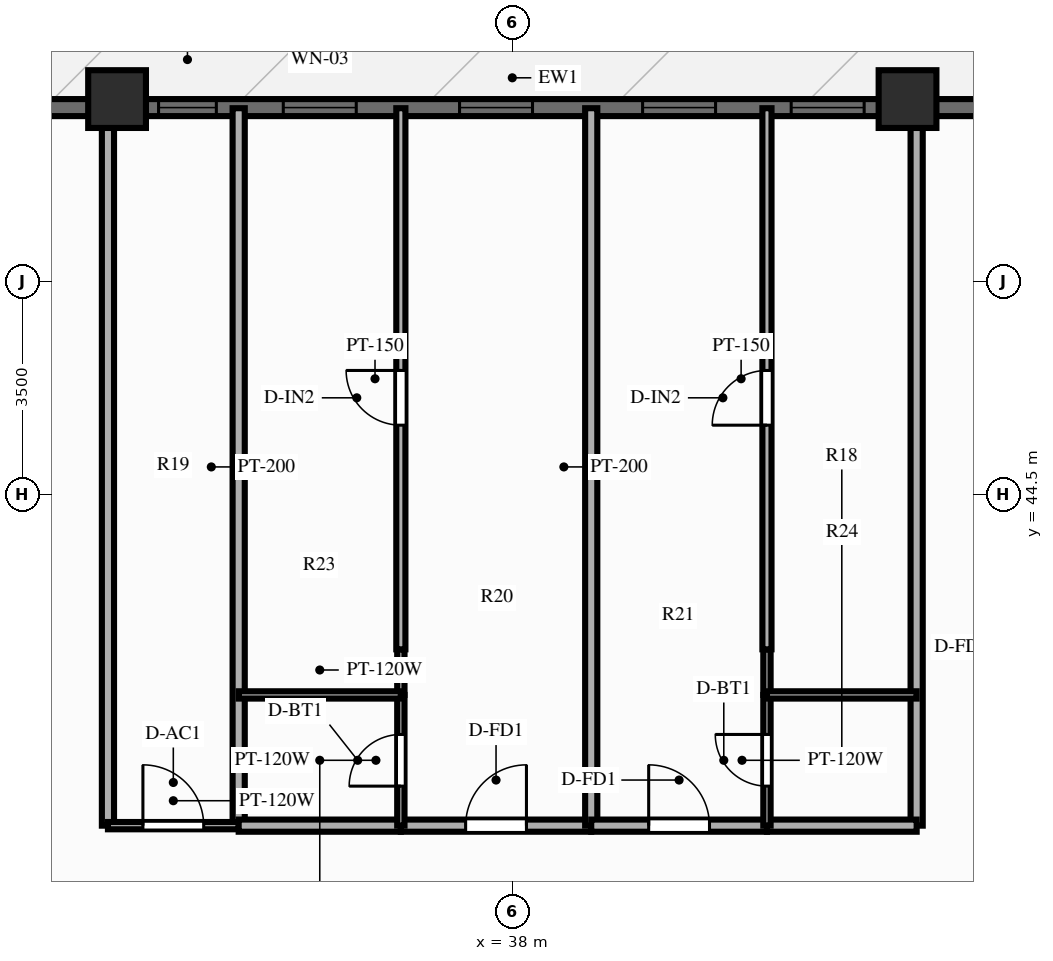
"""IFC4 building model, lengths in metres.
Left out: names, types, materials, properties, quantities, classifications, styles, units other than length and angle.
Written with IfcOpenShell. Run it as: python <this file> out.ifc"""

import sys

from ifc_helpers import new_model, si_unit, direction, frame, frame_2d, origin, origin_2d, place, context, subcontext, project, spatial, rectangle, extrude, source, transform, mapped, element, fill, save


model = new_model("IFC4")
c1 = context("Model", 3, precision=1e-05, world=origin(), true_north=direction((0.0, 1.0)))
c2 = subcontext(c1, "Body", "Model", "MODEL_VIEW")
j1 = project(units=[si_unit("LENGTHUNIT", "METRE"), si_unit("PLANEANGLEUNIT", "RADIAN")], contexts=[c1])
p1 = place(None, origin())
s1 = spatial("IfcSite", under=j1, at=p1, CompositionType="ELEMENT")
p2 = place(p1, origin())
s2 = spatial("IfcBuilding", under=s1, at=p2, CompositionType="ELEMENT")
p3 = place(p2, frame((0.0, 0.0, 95.85)))
s3 = spatial("IfcBuildingStorey", under=s2, at=p3, CompositionType="ELEMENT", Elevation=95.85)
m1 = source(origin(), c2, "Body", "SweptSolid", [
    extrude(rectangle(XDim=0.95, YDim=0.95, at=origin_2d()), origin(), (0.0, 0.0, 1.0), 3.0),
])
for number, where, z_axis, x_axis in (
    (1, (44.5, 51.0, 0.0), (0.0, 0.0, 1.0), (1.0, 0.0, 0.0)),
    (2, (31.5, 51.0, 0.0), (0.0, 0.0, 1.0), (1.0, 0.0, 0.0)),
):
    element("IfcColumn", number, at=place(p3, frame(where, z_axis=z_axis, x_axis=x_axis)), inside=s3, PredefinedType="COLUMN", context=c2, shape_type="MappedRepresentation", body=[
        mapped(m1, transform((0.0, 0.0, 0.0), scale=1.0)),
    ])
p4 = place(p3, frame((16.2, 50.86, 0.0), z_axis=(0.0, 0.0, 1.0), x_axis=(1.0, 0.0, 0.0)))
e3 = element("IfcWall", 3, at=p4, inside=s3, PredefinedType="SOLIDWALL", context=c2, shape_type="SweptSolid", body=[
    extrude(rectangle(XDim=43.6, YDim=0.28, at=frame_2d((21.8, 0.0))), origin(), (0.0, 0.0, 1.0), 2.28),
])
p5 = place(p4, frame((7.1, 0.0, 0.0)))
e4 = element("IfcOpeningElement", 4, at=p5, cuts=e3, PredefinedType="OPENING", context=c2, shape_type="SweptSolid", body=[
    extrude(rectangle(XDim=1.1, YDim=2.15, at=frame_2d((0.55, 1.075))), frame((0.0, 0.152, 0.0), z_axis=(0.0, -1.0, 0.0), x_axis=(1.0, 0.0, 0.0)), (0.0, 0.0, 1.0), 0.304),
])
p6 = place(p4, frame((15.982, 0.0, 0.25)))
e5 = element("IfcOpeningElement", 5, at=p6, cuts=e3, PredefinedType="OPENING", context=c2, shape_type="SweptSolid", body=[
    extrude(rectangle(XDim=0.95, YDim=1.5, at=frame_2d((0.475, 0.75))), frame((0.0, 0.152, 0.0), z_axis=(0.0, -1.0, 0.0), x_axis=(1.0, 0.0, 0.0)), (0.0, 0.0, 1.0), 0.304),
])
p7 = place(p4, frame((18.033, 0.0, 0.25)))
e6 = element("IfcOpeningElement", 6, at=p7, cuts=e3, PredefinedType="OPENING", context=c2, shape_type="SweptSolid", body=[
    extrude(rectangle(XDim=1.2, YDim=1.5, at=frame_2d((0.6, 0.75))), frame((0.0, 0.152, 0.0), z_axis=(0.0, -1.0, 0.0), x_axis=(1.0, 0.0, 0.0)), (0.0, 0.0, 1.0), 0.304),
])
p8 = place(p4, frame((20.933, 0.0, 0.25)))
e7 = element("IfcOpeningElement", 7, at=p8, cuts=e3, PredefinedType="OPENING", context=c2, shape_type="SweptSolid", body=[
    extrude(rectangle(XDim=1.2, YDim=1.5, at=frame_2d((0.6, 0.75))), frame((0.0, 0.152, 0.0), z_axis=(0.0, -1.0, 0.0), x_axis=(1.0, 0.0, 0.0)), (0.0, 0.0, 1.0), 0.304),
])
p9 = place(p4, frame((23.943, 0.0, 0.25)))
e8 = element("IfcOpeningElement", 8, at=p9, cuts=e3, PredefinedType="OPENING", context=c2, shape_type="SweptSolid", body=[
    extrude(rectangle(XDim=1.2, YDim=1.5, at=frame_2d((0.6, 0.75))), frame((0.0, 0.152, 0.0), z_axis=(0.0, -1.0, 0.0), x_axis=(1.0, 0.0, 0.0)), (0.0, 0.0, 1.0), 0.304),
])
p10 = place(p4, frame((26.386, 0.0, 0.25)))
e9 = element("IfcOpeningElement", 9, at=p10, cuts=e3, PredefinedType="OPENING", context=c2, shape_type="SweptSolid", body=[
    extrude(rectangle(XDim=1.2, YDim=1.5, at=frame_2d((0.6, 0.75))), frame((0.0, 0.152, 0.0), z_axis=(0.0, -1.0, 0.0), x_axis=(1.0, 0.0, 0.0)), (0.0, 0.0, 1.0), 0.304),
])
p11 = place(p4, frame((35.35, 0.0, 0.25)))
e10 = element("IfcOpeningElement", 10, at=p11, cuts=e3, PredefinedType="OPENING", context=c2, shape_type="SweptSolid", body=[
    extrude(rectangle(XDim=1.2, YDim=1.5, at=frame_2d((0.6, 0.75))), frame((0.0, 0.152, 0.0), z_axis=(0.0, -1.0, 0.0), x_axis=(1.0, 0.0, 0.0)), (0.0, 0.0, 1.0), 0.304),
])
for number, where, z_axis, x_axis in (
    (11, (31.35, 39.05, 0.0), (0.0, 0.0, 1.0), (0.0, 1.0, 0.0)),
    (12, (44.65, 39.05, 0.0), (0.0, 0.0, 1.0), (0.0, 1.0, 0.0)),
):
    element("IfcWall", number, at=place(p3, frame(where, z_axis=z_axis, x_axis=x_axis)), inside=s3, PredefinedType="PARTITIONING", context=c2, shape_type="SweptSolid", body=[
        extrude(rectangle(XDim=11.8, YDim=0.2, at=frame_2d((5.9, 0.0))), origin(), (0.0, 0.0, 1.0), 2.34),
    ])
p12 = place(p3, frame((33.5, 39.05, 0.0), z_axis=(0.0, 0.0, 1.0), x_axis=(0.0, 1.0, 0.0)))
e13 = element("IfcWall", 13, at=p12, inside=s3, PredefinedType="PARTITIONING", context=c2, shape_type="SweptSolid", body=[
    extrude(rectangle(XDim=11.8, YDim=0.2, at=frame_2d((5.9, 0.0))), origin(), (0.0, 0.0, 1.0), 2.79),
])
p13 = place(p3, frame((31.35, 39.05, 0.0), z_axis=(0.0, 0.0, 1.0), x_axis=(1.0, 0.0, 0.0)))
e14 = element("IfcWall", 14, at=p13, inside=s3, PredefinedType="PARTITIONING", context=c2, shape_type="SweptSolid", body=[
    extrude(rectangle(XDim=2.15, YDim=0.12, at=frame_2d((1.075, 0.0))), origin(), (0.0, 0.0, 1.0), 2.79),
])
p14 = place(p13, frame((0.575, 0.0, 0.0)))
e15 = element("IfcOpeningElement", 15, at=p14, cuts=e14, PredefinedType="OPENING", context=c2, shape_type="SweptSolid", body=[
    extrude(rectangle(XDim=1.0, YDim=2.1, at=frame_2d((0.5, 1.05))), frame((0.0, 0.072, 0.0), z_axis=(0.0, -1.0, 0.0), x_axis=(1.0, 0.0, 0.0)), (0.0, 0.0, 1.0), 0.144),
])
p15 = place(p3, frame((33.5, 39.05, 0.0), z_axis=(0.0, 0.0, 1.0), x_axis=(1.0, 0.0, 0.0)))
e16 = element("IfcWall", 16, at=p15, inside=s3, PredefinedType="PARTITIONING", context=c2, shape_type="SweptSolid", body=[
    extrude(rectangle(XDim=2.667, YDim=0.2, at=frame_2d((1.333, 0.0))), origin(), (0.0, 0.0, 1.0), 2.79),
])
p16 = place(p3, frame((36.167, 39.05, 0.0), z_axis=(0.0, 0.0, 1.0), x_axis=(1.0, 0.0, 0.0)))
e17 = element("IfcWall", 17, at=p16, inside=s3, PredefinedType="PARTITIONING", context=c2, shape_type="SweptSolid", body=[
    extrude(rectangle(XDim=3.131, YDim=0.2, at=frame_2d((1.565, 0.0))), origin(), (0.0, 0.0, 1.0), 2.79),
])
p17 = place(p16, frame((1.065, 0.0, 0.0)))
e18 = element("IfcOpeningElement", 18, at=p17, cuts=e17, PredefinedType="OPENING", context=c2, shape_type="SweptSolid", body=[
    extrude(rectangle(XDim=1.0, YDim=2.15, at=frame_2d((0.5, 1.075))), frame((0.0, 0.112, 0.0), z_axis=(0.0, -1.0, 0.0), x_axis=(1.0, 0.0, 0.0)), (0.0, 0.0, 1.0), 0.224),
])
p18 = place(p3, frame((36.167, 39.05, 0.0), z_axis=(0.0, 0.0, 1.0), x_axis=(0.0, 1.0, 0.0)))
e19 = element("IfcWall", 19, at=p18, inside=s3, PredefinedType="PARTITIONING", context=c2, shape_type="SweptSolid", body=[
    extrude(rectangle(XDim=2.15, YDim=0.12, at=frame_2d((1.075, 0.0))), origin(), (0.0, 0.0, 1.0), 2.79),
])
p19 = place(p18, frame((0.65, 0.0, 0.0)))
e20 = element("IfcOpeningElement", 20, at=p19, cuts=e19, PredefinedType="OPENING", context=c2, shape_type="SweptSolid", body=[
    extrude(rectangle(XDim=0.85, YDim=2.05, at=frame_2d((0.425, 1.025))), frame((0.0, 0.072, 0.0), z_axis=(0.0, -1.0, 0.0), x_axis=(1.0, 0.0, 0.0)), (0.0, 0.0, 1.0), 0.144),
])
p20 = place(p3, frame((36.167, 41.2, 0.0), z_axis=(0.0, 0.0, 1.0), x_axis=(0.0, 1.0, 0.0)))
e21 = element("IfcWall", 21, at=p20, inside=s3, PredefinedType="PARTITIONING", context=c2, shape_type="SweptSolid", body=[
    extrude(rectangle(XDim=0.75, YDim=0.12, at=frame_2d((0.375, 0.0))), origin(), (0.0, 0.0, 1.0), 2.79),
])
p21 = place(p3, frame((33.5, 41.2, 0.0), z_axis=(0.0, 0.0, 1.0), x_axis=(1.0, 0.0, 0.0)))
e22 = element("IfcWall", 22, at=p21, inside=s3, PredefinedType="PARTITIONING", context=c2, shape_type="SweptSolid", body=[
    extrude(rectangle(XDim=2.667, YDim=0.12, at=frame_2d((1.333, 0.0))), origin(), (0.0, 0.0, 1.0), 2.79),
])
p22 = place(p3, frame((36.167, 41.95, 0.0), z_axis=(0.0, 0.0, 1.0), x_axis=(0.0, 1.0, 0.0)))
e23 = element("IfcWall", 23, at=p22, inside=s3, PredefinedType="PARTITIONING", context=c2, shape_type="SweptSolid", body=[
    extrude(rectangle(XDim=8.9, YDim=0.15, at=frame_2d((4.45, 0.0))), origin(), (0.0, 0.0, 1.0), 2.79),
])
p23 = place(p22, frame((3.687, 0.0, 0.0)))
e24 = element("IfcOpeningElement", 24, at=p23, cuts=e23, PredefinedType="OPENING", context=c2, shape_type="SweptSolid", body=[
    extrude(rectangle(XDim=0.9, YDim=2.1, at=frame_2d((0.45, 1.05))), frame((0.0, 0.087, 0.0), z_axis=(0.0, -1.0, 0.0), x_axis=(1.0, 0.0, 0.0)), (0.0, 0.0, 1.0), 0.174),
])
p24 = place(p3, frame((39.298, 39.05, 0.0), z_axis=(0.0, 0.0, 1.0), x_axis=(0.0, 1.0, 0.0)))
e25 = element("IfcWall", 25, at=p24, inside=s3, PredefinedType="PARTITIONING", context=c2, shape_type="SweptSolid", body=[
    extrude(rectangle(XDim=11.8, YDim=0.2, at=frame_2d((5.9, 0.0))), origin(), (0.0, 0.0, 1.0), 2.79),
])
p25 = place(p3, frame((39.298, 39.05, 0.0), z_axis=(0.0, 0.0, 1.0), x_axis=(1.0, 0.0, 0.0)))
e26 = element("IfcWall", 26, at=p25, inside=s3, PredefinedType="PARTITIONING", context=c2, shape_type="SweptSolid", body=[
    extrude(rectangle(XDim=2.89, YDim=0.2, at=frame_2d((1.445, 0.0))), origin(), (0.0, 0.0, 1.0), 2.79),
])
p26 = place(p25, frame((0.945, 0.0, 0.0)))
e27 = element("IfcOpeningElement", 27, at=p26, cuts=e26, PredefinedType="OPENING", context=c2, shape_type="SweptSolid", body=[
    extrude(rectangle(XDim=1.0, YDim=2.15, at=frame_2d((0.5, 1.075))), frame((0.0, 0.112, 0.0), z_axis=(0.0, -1.0, 0.0), x_axis=(1.0, 0.0, 0.0)), (0.0, 0.0, 1.0), 0.224),
])
p27 = place(p3, frame((42.188, 39.05, 0.0), z_axis=(0.0, 0.0, 1.0), x_axis=(1.0, 0.0, 0.0)))
e28 = element("IfcWall", 28, at=p27, inside=s3, PredefinedType="PARTITIONING", context=c2, shape_type="SweptSolid", body=[
    extrude(rectangle(XDim=2.462, YDim=0.2, at=frame_2d((1.231, 0.0))), origin(), (0.0, 0.0, 1.0), 2.79),
])
p28 = place(p3, frame((42.188, 39.05, 0.0), z_axis=(0.0, 0.0, 1.0), x_axis=(0.0, 1.0, 0.0)))
e29 = element("IfcWall", 29, at=p28, inside=s3, PredefinedType="PARTITIONING", context=c2, shape_type="SweptSolid", body=[
    extrude(rectangle(XDim=2.15, YDim=0.12, at=frame_2d((1.075, 0.0))), origin(), (0.0, 0.0, 1.0), 2.79),
])
p29 = place(p28, frame((0.65, 0.0, 0.0)))
e30 = element("IfcOpeningElement", 30, at=p29, cuts=e29, PredefinedType="OPENING", context=c2, shape_type="SweptSolid", body=[
    extrude(rectangle(XDim=0.85, YDim=2.05, at=frame_2d((0.425, 1.025))), frame((0.0, 0.072, 0.0), z_axis=(0.0, -1.0, 0.0), x_axis=(1.0, 0.0, 0.0)), (0.0, 0.0, 1.0), 0.144),
])
p30 = place(p3, frame((42.188, 41.2, 0.0), z_axis=(0.0, 0.0, 1.0), x_axis=(0.0, 1.0, 0.0)))
e31 = element("IfcWall", 31, at=p30, inside=s3, PredefinedType="PARTITIONING", context=c2, shape_type="SweptSolid", body=[
    extrude(rectangle(XDim=0.75, YDim=0.12, at=frame_2d((0.375, 0.0))), origin(), (0.0, 0.0, 1.0), 2.79),
])
p31 = place(p3, frame((42.188, 41.2, 0.0), z_axis=(0.0, 0.0, 1.0), x_axis=(1.0, 0.0, 0.0)))
e32 = element("IfcWall", 32, at=p31, inside=s3, PredefinedType="PARTITIONING", context=c2, shape_type="SweptSolid", body=[
    extrude(rectangle(XDim=2.462, YDim=0.12, at=frame_2d((1.231, 0.0))), origin(), (0.0, 0.0, 1.0), 2.79),
])
p32 = place(p3, frame((42.188, 41.95, 0.0), z_axis=(0.0, 0.0, 1.0), x_axis=(0.0, 1.0, 0.0)))
e33 = element("IfcWall", 33, at=p32, inside=s3, PredefinedType="PARTITIONING", context=c2, shape_type="SweptSolid", body=[
    extrude(rectangle(XDim=8.9, YDim=0.15, at=frame_2d((4.45, 0.0))), origin(), (0.0, 0.0, 1.0), 2.79),
])
p33 = place(p32, frame((3.687, 0.0, 0.0)))
e34 = element("IfcOpeningElement", 34, at=p33, cuts=e33, PredefinedType="OPENING", context=c2, shape_type="SweptSolid", body=[
    extrude(rectangle(XDim=0.9, YDim=2.1, at=frame_2d((0.45, 1.05))), frame((0.0, 0.087, 0.0), z_axis=(0.0, -1.0, 0.0), x_axis=(1.0, 0.0, 0.0)), (0.0, 0.0, 1.0), 0.174),
])
m2 = source(origin(), c2, "Body", "SweptSolid", [
    extrude(rectangle(XDim=0.95, YDim=1.5, at=frame_2d((0.475, 0.75))), frame((0.0, 0.03, 0.0), z_axis=(0.0, -1.0, 0.0), x_axis=(1.0, 0.0, 0.0)), (0.0, 0.0, 1.0), 0.06),
])
p34 = place(p6, origin())
e35 = element("IfcWindow", 35, at=p34, inside=s3, PartitioningType="SINGLE_PANEL", PredefinedType="WINDOW", context=c2, shape_type="MappedRepresentation", body=[
    mapped(m2, transform((0.0, 0.0, 0.0), scale=1.0)),
])
fill(e5, e35)
m3 = source(origin(), c2, "Body", "SweptSolid", [
    extrude(rectangle(XDim=1.2, YDim=1.5, at=frame_2d((0.6, 0.75))), frame((0.0, 0.03, 0.0), z_axis=(0.0, -1.0, 0.0), x_axis=(1.0, 0.0, 0.0)), (0.0, 0.0, 1.0), 0.06),
])
p35 = place(p7, origin())
e36 = element("IfcWindow", 36, at=p35, inside=s3, PartitioningType="SINGLE_PANEL", PredefinedType="WINDOW", context=c2, shape_type="MappedRepresentation", body=[
    mapped(m3, transform((0.0, 0.0, 0.0), scale=1.0)),
])
fill(e6, e36)
p36 = place(p8, origin())
e37 = element("IfcWindow", 37, at=p36, inside=s3, PartitioningType="SINGLE_PANEL", PredefinedType="WINDOW", context=c2, shape_type="MappedRepresentation", body=[
    mapped(m3, transform((0.0, 0.0, 0.0), scale=1.0)),
])
fill(e7, e37)
p37 = place(p9, origin())
e38 = element("IfcWindow", 38, at=p37, inside=s3, PartitioningType="SINGLE_PANEL", PredefinedType="WINDOW", context=c2, shape_type="MappedRepresentation", body=[
    mapped(m3, transform((0.0, 0.0, 0.0), scale=1.0)),
])
fill(e8, e38)
p38 = place(p10, origin())
e39 = element("IfcWindow", 39, at=p38, inside=s3, PartitioningType="SINGLE_PANEL", PredefinedType="WINDOW", context=c2, shape_type="MappedRepresentation", body=[
    mapped(m3, transform((0.0, 0.0, 0.0), scale=1.0)),
])
fill(e9, e39)
m4 = source(origin(), c2, "Body", "SweptSolid", [
    extrude(rectangle(XDim=1.0, YDim=2.1, at=frame_2d((0.5, 1.05))), frame((0.0, 0.025, 0.0), z_axis=(0.0, -1.0, 0.0), x_axis=(1.0, 0.0, 0.0)), (0.0, 0.0, 1.0), 0.05),
])
p39 = place(p14, origin())
e40 = element("IfcDoor", 40, at=p39, inside=s3, OperationType="SINGLE_SWING_LEFT", PredefinedType="DOOR", context=c2, shape_type="MappedRepresentation", body=[
    mapped(m4, transform((0.0, 0.0, 0.0), scale=1.0)),
])
fill(e15, e40)
m5 = source(origin(), c2, "Body", "SweptSolid", [
    extrude(rectangle(XDim=1.0, YDim=2.15, at=frame_2d((0.5, 1.075))), frame((0.0, 0.025, 0.0), z_axis=(0.0, -1.0, 0.0), x_axis=(1.0, 0.0, 0.0)), (0.0, 0.0, 1.0), 0.05),
])
p40 = place(p17, origin())
e41 = element("IfcDoor", 41, at=p40, inside=s3, OperationType="SINGLE_SWING_RIGHT", PredefinedType="DOOR", context=c2, shape_type="MappedRepresentation", body=[
    mapped(m5, transform((0.0, 0.0, 0.0), scale=1.0)),
])
fill(e18, e41)
m6 = source(origin(), c2, "Body", "SweptSolid", [
    extrude(rectangle(XDim=0.85, YDim=2.05, at=frame_2d((0.425, 1.025))), frame((0.0, 0.025, 0.0), z_axis=(0.0, -1.0, 0.0), x_axis=(1.0, 0.0, 0.0)), (0.0, 0.0, 1.0), 0.05),
])
p41 = place(p19, origin())
e42 = element("IfcDoor", 42, at=p41, inside=s3, OperationType="SINGLE_SWING_LEFT", PredefinedType="DOOR", context=c2, shape_type="MappedRepresentation", body=[
    mapped(m6, transform((0.0, 0.0, 0.0), scale=1.0)),
])
fill(e20, e42)
m7 = source(origin(), c2, "Body", "SweptSolid", [
    extrude(rectangle(XDim=0.9, YDim=2.1, at=frame_2d((0.45, 1.05))), frame((0.0, 0.025, 0.0), z_axis=(0.0, -1.0, 0.0), x_axis=(1.0, 0.0, 0.0)), (0.0, 0.0, 1.0), 0.05),
])
p42 = place(p23, origin())
e43 = element("IfcDoor", 43, at=p42, inside=s3, OperationType="SINGLE_SWING_RIGHT", PredefinedType="DOOR", context=c2, shape_type="MappedRepresentation", body=[
    mapped(m7, transform((0.0, 0.0, 0.0), scale=1.0)),
])
fill(e24, e43)
p43 = place(p26, origin())
e44 = element("IfcDoor", 44, at=p43, inside=s3, OperationType="SINGLE_SWING_LEFT", PredefinedType="DOOR", context=c2, shape_type="MappedRepresentation", body=[
    mapped(m5, transform((0.0, 0.0, 0.0), scale=1.0)),
])
fill(e27, e44)
p44 = place(p29, origin())
e45 = element("IfcDoor", 45, at=p44, inside=s3, OperationType="SINGLE_SWING_RIGHT", PredefinedType="DOOR", context=c2, shape_type="MappedRepresentation", body=[
    mapped(m6, transform((0.0, 0.0, 0.0), scale=1.0)),
])
fill(e30, e45)
p45 = place(p33, origin())
e46 = element("IfcDoor", 46, at=p45, inside=s3, OperationType="SINGLE_SWING_LEFT", PredefinedType="DOOR", context=c2, shape_type="MappedRepresentation", body=[
    mapped(m7, transform((0.0, 0.0, 0.0), scale=1.0)),
])
fill(e34, e46)
save(model, sys.argv[1])
